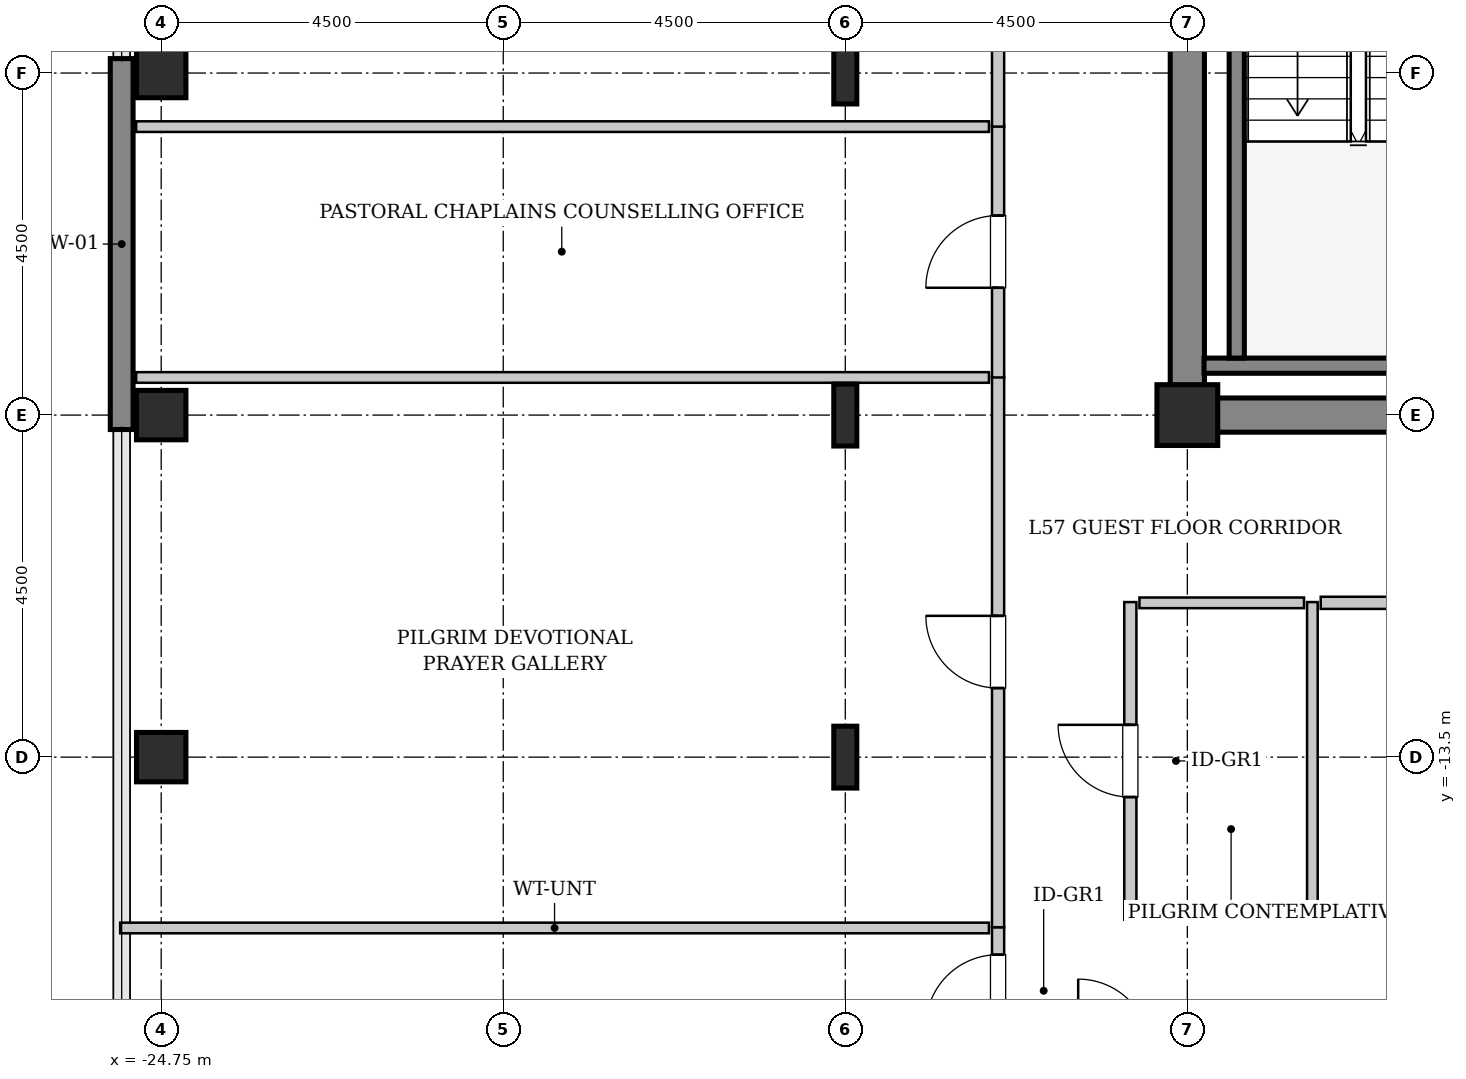
"""IFC4 building model, lengths in metres.
Left out: names, types, materials, properties, quantities, classifications, styles, units other than length and angle.
Written with IfcOpenShell. Run it as: python <this file> out.ifc"""

import sys

from ifc_helpers import new_model, si_unit, direction, frame, frame_2d, origin, origin_2d, place, context, subcontext, project, spatial, rectangle, hollow_rectangle, i_section, extrude, source, transform, mapped, element, fill, save


model = new_model("IFC4")
c1 = context("Model", 3, precision=1e-05, world=origin(), true_north=direction((0.0, 1.0)))
c2 = subcontext(c1, "Body", "Model", "MODEL_VIEW")
j1 = project(units=[si_unit("LENGTHUNIT", "METRE"), si_unit("PLANEANGLEUNIT", "RADIAN")], contexts=[c1])
p1 = place(None, origin())
s1 = spatial("IfcSite", under=j1, at=p1, CompositionType="ELEMENT")
p2 = place(p1, origin())
s2 = spatial("IfcBuilding", under=s1, at=p2, CompositionType="ELEMENT")
p3 = place(p2, frame((0.0, 0.0, 229.4)))
s3 = spatial("IfcBuildingStorey", under=s2, at=p3, CompositionType="ELEMENT", Elevation=229.4)
m1 = source(origin(), c2, "Body", "SweptSolid", [
    extrude(rectangle(XDim=9.925, YDim=0.45, at=frame_2d((4.962, 0.0))), origin(), (0.0, 0.0, 1.0), 3.8),
])
p4 = place(p3, frame((-11.475, -9.0, 0.0), z_axis=(0.0, 0.0, 1.0), x_axis=(1.0, 0.0, 0.0)))
e1 = element("IfcWall", 1, at=p4, inside=s3, PredefinedType="SHEAR", context=c2, shape_type="MappedRepresentation", body=[
    mapped(m1, transform((0.0, 0.0, 0.0), x_axis=(1.0, 0.0, 0.0), y_axis=(0.0, 1.0, 0.0), z_axis=(0.0, 0.0, 1.0), scale=1.0)),
])
m2 = source(origin(), c2, "Body", "SweptSolid", [
    extrude(rectangle(XDim=7.425, YDim=0.45, at=frame_2d((3.712, 0.0))), origin(), (0.0, 0.0, 1.0), 3.8),
])
p5 = place(p3, frame((-11.25, -8.775, 0.0), z_axis=(0.0, 0.0, 1.0), x_axis=(0.0, 1.0, 0.0)))
e2 = element("IfcWall", 2, at=p5, inside=s3, PredefinedType="SHEAR", context=c2, shape_type="MappedRepresentation", body=[
    mapped(m2, transform((0.0, 0.0, 0.0), x_axis=(1.0, 0.0, 0.0), y_axis=(0.0, 1.0, 0.0), z_axis=(0.0, 0.0, 1.0), scale=1.0)),
])
m3 = source(origin(), c2, "Body", "SweptSolid", [
    extrude(hollow_rectangle(XDim=0.65, YDim=0.65, WallThickness=0.032, InnerFilletRadius=0.032, OuterFilletRadius=0.064, at=origin_2d()), origin(), (0.0, 0.0, 1.0), 3.8),
])
for number, where, z_axis, x_axis in (
    (3, (-24.75, -13.5, 0.0), (0.0, 0.0, 1.0), (1.0, 0.0, 0.0)),
    (4, (-24.75, -9.0, 0.0), (0.0, 0.0, 1.0), (1.0, 0.0, 0.0)),
    (5, (-24.75, -4.5, 0.0), (0.0, 0.0, 1.0), (1.0, 0.0, 0.0)),
):
    element("IfcColumn", number, at=place(p3, frame(where, z_axis=z_axis, x_axis=x_axis)), inside=s3, PredefinedType="COLUMN", context=c2, shape_type="MappedRepresentation", body=[
        mapped(m3, transform((0.0, 0.0, 0.0), x_axis=(1.0, 0.0, 0.0), y_axis=(0.0, 1.0, 0.0), z_axis=(0.0, 0.0, 1.0), scale=1.0)),
    ])
m4 = source(origin(), c2, "Body", "SweptSolid", [
    extrude(i_section(OverallWidth=0.303, OverallDepth=0.814, WebThickness=0.021, FlangeThickness=0.04, FilletRadius=0.03, at=origin_2d()), origin(), (0.0, 0.0, 1.0), 3.8),
])
for number, where, z_axis, x_axis in (
    (6, (-15.75, -13.5, 0.0), (0.0, 0.0, 1.0), (1.0, 0.0, 0.0)),
    (7, (-15.75, -9.0, 0.0), (0.0, 0.0, 1.0), (1.0, 0.0, 0.0)),
    (8, (-15.75, -4.5, 0.0), (0.0, 0.0, 1.0), (1.0, 0.0, 0.0)),
):
    element("IfcColumn", number, at=place(p3, frame(where, z_axis=z_axis, x_axis=x_axis)), inside=s3, PredefinedType="COLUMN", context=c2, shape_type="MappedRepresentation", body=[
        mapped(m4, transform((0.0, 0.0, 0.0), x_axis=(1.0, 0.0, 0.0), y_axis=(0.0, 1.0, 0.0), z_axis=(0.0, 0.0, 1.0), scale=1.0)),
    ])
m5 = source(origin(), c2, "Body", "SweptSolid", [
    extrude(hollow_rectangle(XDim=0.8, YDim=0.8, WallThickness=0.04, InnerFilletRadius=0.04, OuterFilletRadius=0.08, at=origin_2d()), origin(), (0.0, 0.0, 1.0), 3.8),
])
p6 = place(p3, frame((-11.25, -9.0, 0.0), z_axis=(0.0, 0.0, 1.0), x_axis=(1.0, 0.0, 0.0)))
e9 = element("IfcColumn", 9, at=p6, inside=s3, PredefinedType="COLUMN", context=c2, shape_type="MappedRepresentation", body=[
    mapped(m5, transform((0.0, 0.0, 0.0), x_axis=(1.0, 0.0, 0.0), y_axis=(0.0, 1.0, 0.0), z_axis=(0.0, 0.0, 1.0), scale=1.0)),
])
m6 = source(origin(), c2, "Body", "SweptSolid", [
    extrude(rectangle(XDim=4.88, YDim=0.3, at=frame_2d((2.44, 0.0))), origin(), (0.0, 0.0, 1.0), 3.55),
])
p7 = place(p3, frame((-25.27, -9.19, 0.0), z_axis=(0.0, 0.0, 1.0), x_axis=(0.0, 1.0, 0.0)))
e10 = element("IfcWall", 10, at=p7, inside=s3, PredefinedType="SHEAR", context=c2, shape_type="MappedRepresentation", body=[
    mapped(m6, transform((0.0, 0.0, 0.0), x_axis=(1.0, 0.0, 0.0), y_axis=(0.0, 1.0, 0.0), z_axis=(0.0, 0.0, 1.0), scale=1.0)),
])
m7 = source(origin(), c2, "Body", "SweptSolid", [
    extrude(rectangle(XDim=3.73, YDim=0.2, at=frame_2d((1.865, 0.0))), origin(), (0.0, 0.0, 1.0), 3.8),
])
p8 = place(p3, frame((-11.03, -8.35, 0.0), z_axis=(0.0, 0.0, 1.0), x_axis=(1.0, 0.0, 0.0)))
e11 = element("IfcWall", 11, at=p8, inside=s3, PredefinedType="SOLIDWALL", context=c2, shape_type="MappedRepresentation", body=[
    mapped(m7, transform((0.0, 0.0, 0.0), x_axis=(1.0, 0.0, 0.0), y_axis=(0.0, 1.0, 0.0), z_axis=(0.0, 0.0, 1.0), scale=1.0)),
])
m8 = source(origin(), c2, "Body", "SweptSolid", [
    extrude(rectangle(XDim=7.1, YDim=0.2, at=frame_2d((3.55, 0.0))), origin(), (0.0, 0.0, 1.0), 3.8),
])
p9 = place(p3, frame((-10.6, -1.15, 0.0), z_axis=(0.0, 0.0, 1.0), x_axis=(0.0, -1.0, 0.0)))
e12 = element("IfcWall", 12, at=p9, inside=s3, PredefinedType="SOLIDWALL", context=c2, shape_type="MappedRepresentation", body=[
    mapped(m8, transform((0.0, 0.0, 0.0), x_axis=(1.0, 0.0, 0.0), y_axis=(0.0, 1.0, 0.0), z_axis=(0.0, 0.0, 1.0), scale=1.0)),
])
m9 = source(origin(), c2, "Body", "SweptSolid", [
    extrude(rectangle(XDim=5.502, YDim=0.16, at=frame_2d((2.751, 0.0))), origin(), (0.0, 0.0, 1.0), 3.535),
])
p10 = place(p3, frame((-13.74, -21.24, 0.0), z_axis=(0.0, 0.0, 1.0), x_axis=(0.0, 1.0, 0.0)))
e13 = element("IfcWall", 13, at=p10, inside=s3, PredefinedType="PARTITIONING", context=c2, shape_type="MappedRepresentation", body=[
    mapped(m9, transform((0.0, 0.0, 0.0), x_axis=(1.0, 0.0, 0.0), y_axis=(0.0, 1.0, 0.0), z_axis=(0.0, 0.0, 1.0), scale=1.0)),
])
p11 = place(p10, frame((4.191, 0.0, 0.0)))
e14 = element("IfcOpeningElement", 14, at=p11, cuts=e13, PredefinedType="OPENING", context=c2, shape_type="SweptSolid", body=[
    extrude(rectangle(XDim=0.95, YDim=2.1, at=frame_2d((0.475, 1.05))), frame((0.0, 0.09, 0.0), z_axis=(0.0, -1.0, 0.0), x_axis=(1.0, 0.0, 0.0)), (0.0, 0.0, 1.0), 0.18),
])
m10 = source(origin(), c2, "Body", "SweptSolid", [
    extrude(rectangle(XDim=11.43, YDim=0.14, at=frame_2d((5.715, 0.0))), origin(), (0.0, 0.0, 1.0), 3.535),
])
p12 = place(p3, frame((-25.29, -15.748, 0.0), z_axis=(0.0, 0.0, 1.0), x_axis=(1.0, 0.0, 0.0)))
e15 = element("IfcWall", 15, at=p12, inside=s3, PredefinedType="PARTITIONING", context=c2, shape_type="MappedRepresentation", body=[
    mapped(m10, transform((0.0, 0.0, 0.0), x_axis=(1.0, 0.0, 0.0), y_axis=(0.0, 1.0, 0.0), z_axis=(0.0, 0.0, 1.0), scale=1.0)),
])
m11 = source(origin(), c2, "Body", "SweptSolid", [
    extrude(rectangle(XDim=7.242, YDim=0.16, at=frame_2d((3.621, 0.0))), origin(), (0.0, 0.0, 1.0), 3.535),
])
p13 = place(p3, frame((-13.74, -15.738, 0.0), z_axis=(0.0, 0.0, 1.0), x_axis=(0.0, 1.0, 0.0)))
e16 = element("IfcWall", 16, at=p13, inside=s3, PredefinedType="PARTITIONING", context=c2, shape_type="MappedRepresentation", body=[
    mapped(m11, transform((0.0, 0.0, 0.0), x_axis=(1.0, 0.0, 0.0), y_axis=(0.0, 1.0, 0.0), z_axis=(0.0, 0.0, 1.0), scale=1.0)),
])
p14 = place(p13, frame((3.146, 0.0, 0.0)))
e17 = element("IfcOpeningElement", 17, at=p14, cuts=e16, PredefinedType="OPENING", context=c2, shape_type="SweptSolid", body=[
    extrude(rectangle(XDim=0.95, YDim=2.1, at=frame_2d((0.475, 1.05))), frame((0.0, 0.09, 0.0), z_axis=(0.0, -1.0, 0.0), x_axis=(1.0, 0.0, 0.0)), (0.0, 0.0, 1.0), 0.18),
])
m12 = source(origin(), c2, "Body", "SweptSolid", [
    extrude(rectangle(XDim=11.22, YDim=0.14, at=frame_2d((5.61, 0.0))), origin(), (0.0, 0.0, 1.0), 2.925),
])
p15 = place(p3, frame((-25.08, -8.505, 0.0), z_axis=(0.0, 0.0, 1.0), x_axis=(1.0, 0.0, 0.0)))
e18 = element("IfcWall", 18, at=p15, inside=s3, PredefinedType="PARTITIONING", context=c2, shape_type="MappedRepresentation", body=[
    mapped(m12, transform((0.0, 0.0, 0.0), x_axis=(1.0, 0.0, 0.0), y_axis=(0.0, 1.0, 0.0), z_axis=(0.0, 0.0, 1.0), scale=1.0)),
])
m13 = source(origin(), c2, "Body", "SweptSolid", [
    extrude(rectangle(XDim=3.31, YDim=0.16, at=frame_2d((1.655, 0.0))), origin(), (0.0, 0.0, 1.0), 3.535),
])
p16 = place(p3, frame((-13.74, -8.505, 0.0), z_axis=(0.0, 0.0, 1.0), x_axis=(0.0, 1.0, 0.0)))
e19 = element("IfcWall", 19, at=p16, inside=s3, PredefinedType="PARTITIONING", context=c2, shape_type="MappedRepresentation", body=[
    mapped(m13, transform((0.0, 0.0, 0.0), x_axis=(1.0, 0.0, 0.0), y_axis=(0.0, 1.0, 0.0), z_axis=(0.0, 0.0, 1.0), scale=1.0)),
])
p17 = place(p16, frame((1.18, 0.0, 0.0)))
e20 = element("IfcOpeningElement", 20, at=p17, cuts=e19, PredefinedType="OPENING", context=c2, shape_type="SweptSolid", body=[
    extrude(rectangle(XDim=0.95, YDim=2.1, at=frame_2d((0.475, 1.05))), frame((0.0, 0.09, 0.0), z_axis=(0.0, -1.0, 0.0), x_axis=(1.0, 0.0, 0.0)), (0.0, 0.0, 1.0), 0.18),
])
m14 = source(origin(), c2, "Body", "SweptSolid", [
    extrude(rectangle(XDim=11.22, YDim=0.14, at=frame_2d((5.61, 0.0))), origin(), (0.0, 0.0, 1.0), 3.535),
])
p18 = place(p3, frame((-25.08, -5.205, 0.0), z_axis=(0.0, 0.0, 1.0), x_axis=(1.0, 0.0, 0.0)))
e21 = element("IfcWall", 21, at=p18, inside=s3, PredefinedType="PARTITIONING", context=c2, shape_type="MappedRepresentation", body=[
    mapped(m14, transform((0.0, 0.0, 0.0), x_axis=(1.0, 0.0, 0.0), y_axis=(0.0, 1.0, 0.0), z_axis=(0.0, 0.0, 1.0), scale=1.0)),
])
m15 = source(origin(), c2, "Body", "SweptSolid", [
    extrude(rectangle(XDim=10.31, YDim=0.16, at=frame_2d((5.155, 0.0))), origin(), (0.0, 0.0, 1.0), 3.535),
])
p19 = place(p3, frame((-13.74, -5.205, 0.0), z_axis=(0.0, 0.0, 1.0), x_axis=(0.0, 1.0, 0.0)))
e22 = element("IfcWall", 22, at=p19, inside=s3, PredefinedType="PARTITIONING", context=c2, shape_type="MappedRepresentation", body=[
    mapped(m15, transform((0.0, 0.0, 0.0), x_axis=(1.0, 0.0, 0.0), y_axis=(0.0, 1.0, 0.0), z_axis=(0.0, 0.0, 1.0), scale=1.0)),
])
p20 = place(p19, frame((4.68, 0.0, 0.0)))
e23 = element("IfcOpeningElement", 23, at=p20, cuts=e22, PredefinedType="OPENING", context=c2, shape_type="SweptSolid", body=[
    extrude(rectangle(XDim=0.95, YDim=2.1, at=frame_2d((0.475, 1.05))), frame((0.0, 0.09, 0.0), z_axis=(0.0, -1.0, 0.0), x_axis=(1.0, 0.0, 0.0)), (0.0, 0.0, 1.0), 0.18),
])
m16 = source(origin(), c2, "Body", "SweptSolid", [
    extrude(rectangle(XDim=4.18, YDim=0.16, at=frame_2d((2.09, 0.0))), origin(), (0.0, 0.0, 1.0), 3.535),
])
p21 = place(p3, frame((-12.0, -15.64, 0.0), z_axis=(0.0, 0.0, 1.0), x_axis=(0.0, 1.0, 0.0)))
e24 = element("IfcWall", 24, at=p21, inside=s3, PredefinedType="PARTITIONING", context=c2, shape_type="MappedRepresentation", body=[
    mapped(m16, transform((0.0, 0.0, 0.0), x_axis=(1.0, 0.0, 0.0), y_axis=(0.0, 1.0, 0.0), z_axis=(0.0, 0.0, 1.0), scale=1.0)),
])
p22 = place(p21, frame((1.615, 0.0, 0.0)))
e25 = element("IfcOpeningElement", 25, at=p22, cuts=e24, PredefinedType="OPENING", context=c2, shape_type="SweptSolid", body=[
    extrude(rectangle(XDim=0.95, YDim=2.1, at=frame_2d((0.475, 1.05))), frame((0.0, 0.09, 0.0), z_axis=(0.0, -1.0, 0.0), x_axis=(1.0, 0.0, 0.0)), (0.0, 0.0, 1.0), 0.18),
])
m17 = source(origin(), c2, "Body", "SweptSolid", [
    extrude(rectangle(XDim=4.18, YDim=0.14, at=frame_2d((2.09, 0.0))), origin(), (0.0, 0.0, 1.0), 3.535),
])
p23 = place(p3, frame((-9.605, -15.64, 0.0), z_axis=(0.0, 0.0, 1.0), x_axis=(0.0, 1.0, 0.0)))
e26 = element("IfcWall", 26, at=p23, inside=s3, PredefinedType="PARTITIONING", context=c2, shape_type="MappedRepresentation", body=[
    mapped(m17, transform((0.0, 0.0, 0.0), x_axis=(1.0, 0.0, 0.0), y_axis=(0.0, 1.0, 0.0), z_axis=(0.0, 0.0, 1.0), scale=1.0)),
])
m18 = source(origin(), c2, "Body", "SweptSolid", [
    extrude(rectangle(XDim=2.165, YDim=0.14, at=frame_2d((1.083, 0.0))), origin(), (0.0, 0.0, 1.0), 3.535),
])
for number, where, z_axis, x_axis in (
    (27, (-11.88, -11.47, 0.0), (0.0, 0.0, 1.0), (1.0, 0.0, 0.0)),
    (28, (-11.88, -15.63, 0.0), (0.0, 0.0, 1.0), (1.0, 0.0, 0.0)),
):
    element("IfcWall", number, at=place(p3, frame(where, z_axis=z_axis, x_axis=x_axis)), inside=s3, PredefinedType="PARTITIONING", context=c2, shape_type="MappedRepresentation", body=[
        mapped(m18, transform((0.0, 0.0, 0.0), x_axis=(1.0, 0.0, 0.0), y_axis=(0.0, 1.0, 0.0), z_axis=(0.0, 0.0, 1.0), scale=1.0)),
    ])
m19 = source(origin(), c2, "Body", "SweptSolid", [
    extrude(rectangle(XDim=4.5, YDim=0.16, at=frame_2d((2.25, 0.0))), origin(), (0.0, 0.0, 1.0), 3.535),
])
p24 = place(p3, frame((-9.495, -11.47, 0.0), z_axis=(0.0, 0.0, 1.0), x_axis=(1.0, 0.0, 0.0)))
e29 = element("IfcWall", 29, at=p24, inside=s3, PredefinedType="PARTITIONING", context=c2, shape_type="MappedRepresentation", body=[
    mapped(m19, transform((0.0, 0.0, 0.0), x_axis=(1.0, 0.0, 0.0), y_axis=(0.0, 1.0, 0.0), z_axis=(0.0, 0.0, 1.0), scale=1.0)),
])
p25 = place(p24, frame((1.775, 0.0, 0.0)))
e30 = element("IfcOpeningElement", 30, at=p25, cuts=e29, PredefinedType="OPENING", context=c2, shape_type="SweptSolid", body=[
    extrude(rectangle(XDim=0.95, YDim=2.1, at=frame_2d((0.475, 1.05))), frame((0.0, 0.09, 0.0), z_axis=(0.0, -1.0, 0.0), x_axis=(1.0, 0.0, 0.0)), (0.0, 0.0, 1.0), 0.18),
])
m20 = source(origin(), c2, "Body", "SweptSolid", [
    extrude(rectangle(XDim=4.5, YDim=0.14, at=frame_2d((2.25, 0.0))), origin(), (0.0, 0.0, 1.0), 3.535),
])
p26 = place(p3, frame((-9.495, -15.63, 0.0), z_axis=(0.0, 0.0, 1.0), x_axis=(1.0, 0.0, 0.0)))
e31 = element("IfcWall", 31, at=p26, inside=s3, PredefinedType="PARTITIONING", context=c2, shape_type="MappedRepresentation", body=[
    mapped(m20, transform((0.0, 0.0, 0.0), x_axis=(1.0, 0.0, 0.0), y_axis=(0.0, 1.0, 0.0), z_axis=(0.0, 0.0, 1.0), scale=1.0)),
])
m21 = source(origin(), c2, "Body", "SweptSolid", [
    extrude(rectangle(XDim=0.95, YDim=2.1, at=frame_2d((0.475, 1.05))), frame((0.0, 0.025, 0.0), z_axis=(0.0, -1.0, 0.0), x_axis=(1.0, 0.0, 0.0)), (0.0, 0.0, 1.0), 0.05),
])
p27 = place(p11, origin())
e32 = element("IfcDoor", 32, at=p27, inside=s3, OperationType="SINGLE_SWING_LEFT", PredefinedType="DOOR", context=c2, shape_type="MappedRepresentation", body=[
    mapped(m21, transform((0.0, 0.0, 0.0), x_axis=(1.0, 0.0, 0.0), y_axis=(0.0, 1.0, 0.0), z_axis=(0.0, 0.0, 1.0), scale=1.0)),
])
fill(e14, e32)
p28 = place(p14, origin())
e33 = element("IfcDoor", 33, at=p28, inside=s3, OperationType="SINGLE_SWING_RIGHT", PredefinedType="DOOR", context=c2, shape_type="MappedRepresentation", body=[
    mapped(m21, transform((0.0, 0.0, 0.0), x_axis=(1.0, 0.0, 0.0), y_axis=(0.0, 1.0, 0.0), z_axis=(0.0, 0.0, 1.0), scale=1.0)),
])
fill(e17, e33)
p29 = place(p17, origin())
e34 = element("IfcDoor", 34, at=p29, inside=s3, OperationType="SINGLE_SWING_LEFT", PredefinedType="DOOR", context=c2, shape_type="MappedRepresentation", body=[
    mapped(m21, transform((0.0, 0.0, 0.0), x_axis=(1.0, 0.0, 0.0), y_axis=(0.0, 1.0, 0.0), z_axis=(0.0, 0.0, 1.0), scale=1.0)),
])
fill(e20, e34)
p30 = place(p22, origin())
e35 = element("IfcDoor", 35, at=p30, inside=s3, OperationType="SINGLE_SWING_RIGHT", PredefinedType="DOOR", context=c2, shape_type="MappedRepresentation", body=[
    mapped(m21, transform((0.0, 0.0, 0.0), x_axis=(1.0, 0.0, 0.0), y_axis=(0.0, 1.0, 0.0), z_axis=(0.0, 0.0, 1.0), scale=1.0)),
])
fill(e25, e35)
save(model, sys.argv[1])
